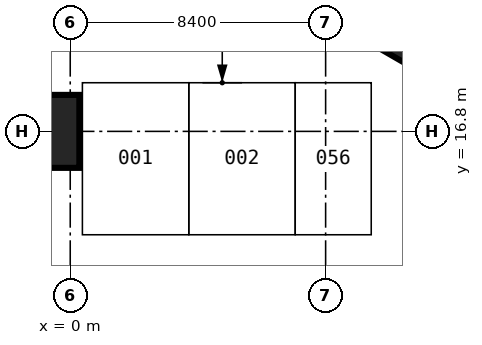
"""IFC4 building model, lengths in metres.
Left out: names, types, materials, properties, quantities, classifications, styles, units other than length and angle.
Written with IfcOpenShell. Run it as: python <this file> out.ifc"""

import sys

from ifc_helpers import new_model, si_unit, direction, frame, origin, origin_2d, place, context, subcontext, project, spatial, rectangle, hollow_rectangle, extrude, element, save


model = new_model("IFC4")
c1 = context("Model", 3, precision=1e-05, world=origin(), true_north=direction((0.0, 1.0)))
c2 = subcontext(c1, "Body", "Model", "MODEL_VIEW")
j1 = project(units=[si_unit("LENGTHUNIT", "METRE"), si_unit("PLANEANGLEUNIT", "RADIAN")], contexts=[c1])
p1 = place(None, origin())
s1 = spatial("IfcSite", under=j1, at=p1, CompositionType="ELEMENT")
p2 = place(p1, origin())
s2 = spatial("IfcBuilding", under=s1, at=p2, CompositionType="ELEMENT")
p3 = place(p2, frame((0.0, 0.0, -9.0)))
s3 = spatial("IfcBuildingStorey", under=s2, at=p3, CompositionType="ELEMENT", Elevation=-9.0)
p4 = place(p3, frame((-0.9, 16.8, 0.0), z_axis=(0.0, 0.0, 1.0), x_axis=(1.0, 0.0, 0.0)))
e1 = element("IfcColumn", 1, at=p4, inside=s3, PredefinedType="COLUMN", context=c2, shape_type="SweptSolid", body=[
    extrude(rectangle(XDim=2.4, YDim=2.4, at=origin_2d()), origin(), (0.0, 0.0, 1.0), 4.5),
])
p5 = place(p3, frame((11.5, 19.919, 0.0), z_axis=(0.0, 0.0, 1.0), x_axis=(0.5, 0.866025403784, 0.0)))
e2 = element("IfcColumn", 2, at=p5, inside=s3, PredefinedType="COLUMN", context=c2, shape_type="SweptSolid", body=[
    extrude(hollow_rectangle(XDim=2.0, YDim=2.0, WallThickness=0.24, at=origin_2d()), origin(), (0.0, 0.0, 1.0), 4.5),
])
save(model, sys.argv[1])
